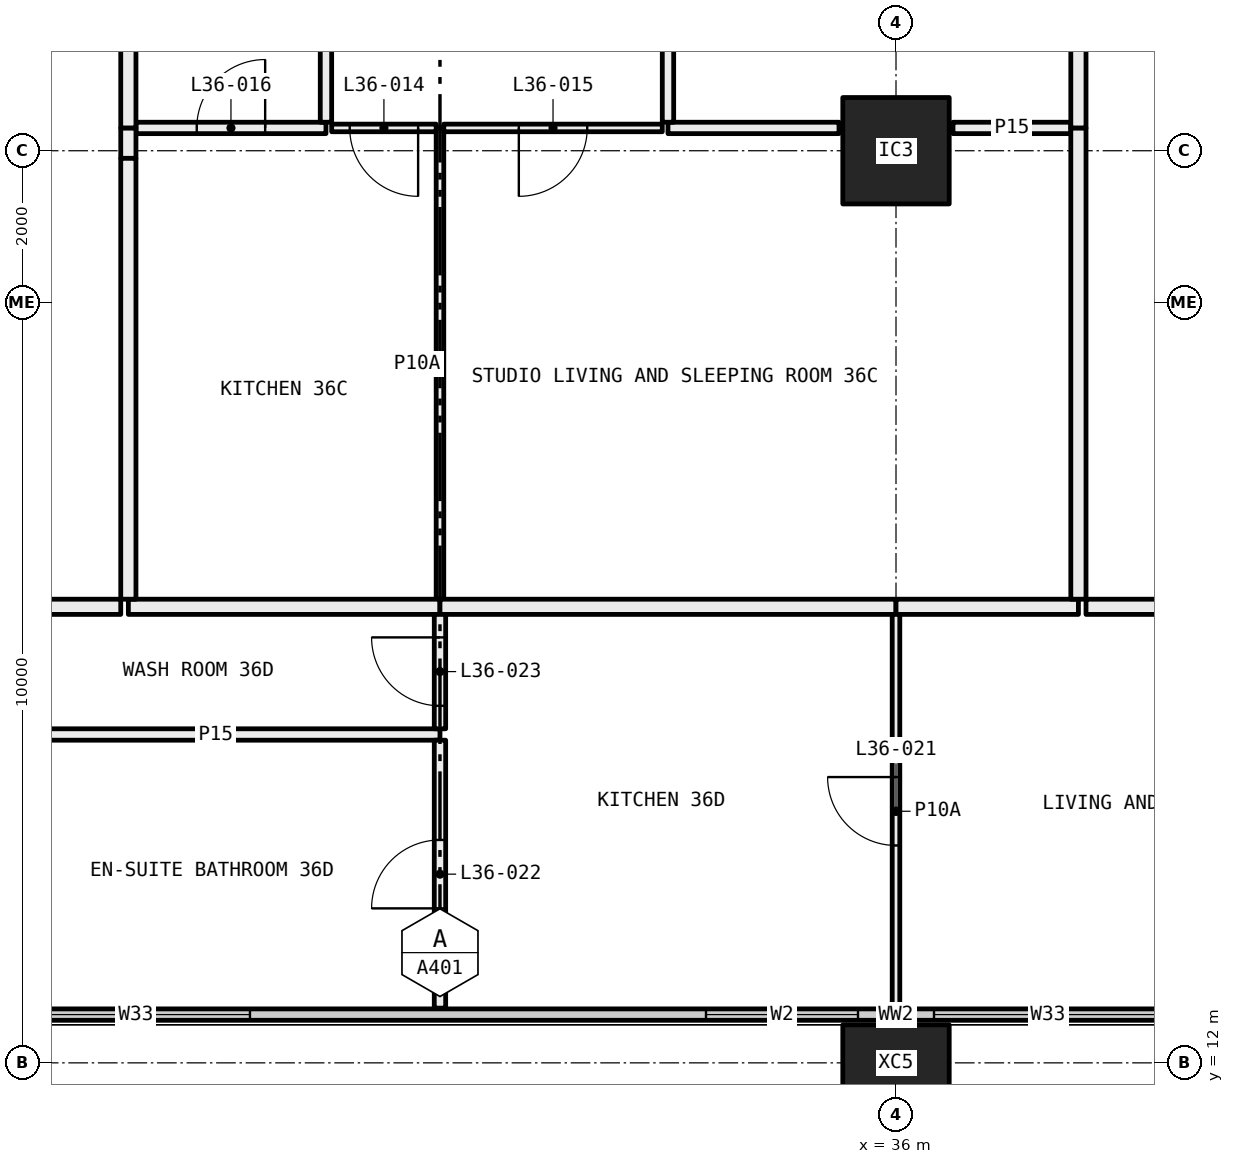
"""IFC4 building model, lengths in metres.
Left out: names, types, materials, properties, quantities, classifications, styles, units other than length and angle.
Written with IfcOpenShell. Run it as: python <this file> out.ifc"""

import sys

from ifc_helpers import new_model, si_unit, direction, frame, frame_2d, origin, origin_2d, place, context, subcontext, project, spatial, rectangle, hollow_rectangle, extrude, element, fill, save


model = new_model("IFC4")
c1 = context("Model", 3, precision=1e-05, world=origin(), true_north=direction((0.0, 1.0)))
c2 = subcontext(c1, "Body", "Model", "MODEL_VIEW")
j1 = project(units=[si_unit("LENGTHUNIT", "METRE"), si_unit("PLANEANGLEUNIT", "RADIAN")], contexts=[c1])
p1 = place(None, origin())
s1 = spatial("IfcSite", under=j1, at=p1, CompositionType="ELEMENT")
p2 = place(p1, origin())
s2 = spatial("IfcBuilding", under=s1, at=p2, CompositionType="ELEMENT")
p3 = place(p2, frame((0.0, 0.0, 138.0)))
s3 = spatial("IfcBuildingStorey", under=s2, at=p3, CompositionType="ELEMENT", Elevation=138.0)
p4 = place(p3, frame((36.0, 12.0, -0.4), z_axis=(0.0, 0.0, 1.0), x_axis=(1.0, 0.0, 0.0)))
e1 = element("IfcColumn", 1, at=p4, inside=s3, PredefinedType="COLUMN", context=c2, shape_type="SweptSolid", body=[
    extrude(hollow_rectangle(XDim=1.4, YDim=1.0, WallThickness=0.055, at=origin_2d()), origin(), (0.0, 0.0, 1.0), 3.45),
])
p5 = place(p3, frame((36.0, 24.0, 0.0), z_axis=(0.0, 0.0, 1.0), x_axis=(1.0, 0.0, 0.0)))
e2 = element("IfcColumn", 2, at=p5, inside=s3, PredefinedType="COLUMN", context=c2, shape_type="SweptSolid", body=[
    extrude(hollow_rectangle(XDim=1.4, YDim=1.4, WallThickness=0.06, at=origin_2d()), origin(), (0.0, 0.0, 1.0), 3.05),
])
p6 = place(p3, frame((6.56, 12.635, 0.0), z_axis=(0.0, 0.0, 1.0), x_axis=(1.0, 0.0, 0.0)))
e3 = element("IfcWall", 3, at=p6, inside=s3, PredefinedType="ELEMENTEDWALL", context=c2, shape_type="SweptSolid", body=[
    extrude(rectangle(XDim=58.88, YDim=0.15, at=frame_2d((29.44, 0.0))), origin(), (0.0, 0.0, 1.0), 3.05),
])
p7 = place(p6, frame((0.44, 0.0, 0.45)))
e4 = element("IfcOpeningElement", 4, at=p7, cuts=e3, PredefinedType="OPENING", context=c2, shape_type="SweptSolid", body=[
    extrude(rectangle(XDim=4.5, YDim=2.55, at=frame_2d((2.25, 1.275))), frame((0.0, 0.085, 0.0), z_axis=(0.0, -1.0, 0.0), x_axis=(1.0, 0.0, 0.0)), (0.0, 0.0, 1.0), 0.17),
])
p8 = place(p6, frame((5.94, 0.0, 0.45)))
e5 = element("IfcOpeningElement", 5, at=p8, cuts=e3, PredefinedType="OPENING", context=c2, shape_type="SweptSolid", body=[
    extrude(rectangle(XDim=3.0, YDim=2.55, at=frame_2d((1.5, 1.275))), frame((0.0, 0.085, 0.0), z_axis=(0.0, -1.0, 0.0), x_axis=(1.0, 0.0, 0.0)), (0.0, 0.0, 1.0), 0.17),
])
p9 = place(p6, frame((13.94, 0.0, 0.45)))
e6 = element("IfcOpeningElement", 6, at=p9, cuts=e3, PredefinedType="OPENING", context=c2, shape_type="SweptSolid", body=[
    extrude(rectangle(XDim=3.0, YDim=2.55, at=frame_2d((1.5, 1.275))), frame((0.0, 0.085, 0.0), z_axis=(0.0, -1.0, 0.0), x_axis=(1.0, 0.0, 0.0)), (0.0, 0.0, 1.0), 0.17),
])
p10 = place(p6, frame((17.94, 0.0, 0.45)))
e7 = element("IfcOpeningElement", 7, at=p10, cuts=e3, PredefinedType="OPENING", context=c2, shape_type="SweptSolid", body=[
    extrude(rectangle(XDim=3.0, YDim=2.55, at=frame_2d((1.5, 1.275))), frame((0.0, 0.085, 0.0), z_axis=(0.0, -1.0, 0.0), x_axis=(1.0, 0.0, 0.0)), (0.0, 0.0, 1.0), 0.17),
])
p11 = place(p6, frame((26.94, 0.0, 0.45)))
e8 = element("IfcOpeningElement", 8, at=p11, cuts=e3, PredefinedType="OPENING", context=c2, shape_type="SweptSolid", body=[
    extrude(rectangle(XDim=2.0, YDim=2.55, at=frame_2d((1.0, 1.275))), frame((0.0, 0.085, 0.0), z_axis=(0.0, -1.0, 0.0), x_axis=(1.0, 0.0, 0.0)), (0.0, 0.0, 1.0), 0.17),
])
p12 = place(p6, frame((29.94, 0.0, 0.45)))
e9 = element("IfcOpeningElement", 9, at=p12, cuts=e3, PredefinedType="OPENING", context=c2, shape_type="SweptSolid", body=[
    extrude(rectangle(XDim=3.0, YDim=2.55, at=frame_2d((1.5, 1.275))), frame((0.0, 0.085, 0.0), z_axis=(0.0, -1.0, 0.0), x_axis=(1.0, 0.0, 0.0)), (0.0, 0.0, 1.0), 0.17),
])
p13 = place(p6, frame((37.94, 0.0, 0.45)))
e10 = element("IfcOpeningElement", 10, at=p13, cuts=e3, PredefinedType="OPENING", context=c2, shape_type="SweptSolid", body=[
    extrude(rectangle(XDim=3.0, YDim=2.55, at=frame_2d((1.5, 1.275))), frame((0.0, 0.085, 0.0), z_axis=(0.0, -1.0, 0.0), x_axis=(1.0, 0.0, 0.0)), (0.0, 0.0, 1.0), 0.17),
])
p14 = place(p6, frame((41.94, 0.0, 0.45)))
e11 = element("IfcOpeningElement", 11, at=p14, cuts=e3, PredefinedType="OPENING", context=c2, shape_type="SweptSolid", body=[
    extrude(rectangle(XDim=3.0, YDim=2.55, at=frame_2d((1.5, 1.275))), frame((0.0, 0.085, 0.0), z_axis=(0.0, -1.0, 0.0), x_axis=(1.0, 0.0, 0.0)), (0.0, 0.0, 1.0), 0.17),
])
p15 = place(p6, frame((50.94, 0.0, 0.45)))
e12 = element("IfcOpeningElement", 12, at=p15, cuts=e3, PredefinedType="OPENING", context=c2, shape_type="SweptSolid", body=[
    extrude(rectangle(XDim=2.0, YDim=2.55, at=frame_2d((1.0, 1.275))), frame((0.0, 0.085, 0.0), z_axis=(0.0, -1.0, 0.0), x_axis=(1.0, 0.0, 0.0)), (0.0, 0.0, 1.0), 0.17),
])
p16 = place(p6, frame((53.94, 0.0, 0.45)))
e13 = element("IfcOpeningElement", 13, at=p16, cuts=e3, PredefinedType="OPENING", context=c2, shape_type="SweptSolid", body=[
    extrude(rectangle(XDim=4.5, YDim=2.55, at=frame_2d((2.25, 1.275))), frame((0.0, 0.085, 0.0), z_axis=(0.0, -1.0, 0.0), x_axis=(1.0, 0.0, 0.0)), (0.0, 0.0, 1.0), 0.17),
])
p17 = place(p3, frame((30.0, 18.1, 0.0), z_axis=(0.0, 0.0, 1.0), x_axis=(0.0, 1.0, 0.0)))
e14 = element("IfcWall", 14, at=p17, inside=s3, PredefinedType="PARTITIONING", context=c2, shape_type="SweptSolid", body=[
    extrude(rectangle(XDim=6.2, YDim=0.1, at=frame_2d((3.1, 0.0))), origin(), (0.0, 0.0, 1.0), 2.45),
])
p18 = place(p3, frame((28.5, 24.3, 0.0), z_axis=(0.0, 0.0, 1.0), x_axis=(-1.0, 0.0, 0.0)))
e15 = element("IfcWall", 15, at=p18, inside=s3, PredefinedType="PARTITIONING", context=c2, shape_type="SweptSolid", body=[
    extrude(rectangle(XDim=2.5, YDim=0.15, at=frame_2d((1.25, 0.0))), origin(), (0.0, 0.0, 1.0), 3.05),
])
p19 = place(p18, frame((0.8, 0.0, 0.0)))
e16 = element("IfcOpeningElement", 16, at=p19, cuts=e15, PredefinedType="OPENING", context=c2, shape_type="SweptSolid", body=[
    extrude(rectangle(XDim=0.9, YDim=2.1, at=frame_2d((0.45, 1.05))), frame((0.0, 0.085, 0.0), z_axis=(0.0, -1.0, 0.0), x_axis=(1.0, 0.0, 0.0)), (0.0, 0.0, 1.0), 0.17),
])
p20 = place(p3, frame((29.95, 24.3, 0.0), z_axis=(0.0, 0.0, 1.0), x_axis=(-1.0, 0.0, 0.0)))
e17 = element("IfcWall", 17, at=p20, inside=s3, PredefinedType="PARTITIONING", context=c2, shape_type="SweptSolid", body=[
    extrude(rectangle(XDim=1.375, YDim=0.1, at=frame_2d((0.688, 0.0))), origin(), (0.0, 0.0, 1.0), 3.05),
])
p21 = place(p20, frame((0.238, 0.0, 0.0)))
e18 = element("IfcOpeningElement", 18, at=p21, cuts=e17, PredefinedType="OPENING", context=c2, shape_type="SweptSolid", body=[
    extrude(rectangle(XDim=0.9, YDim=2.1, at=frame_2d((0.45, 1.05))), frame((0.0, 0.06, 0.0), z_axis=(0.0, -1.0, 0.0), x_axis=(1.0, 0.0, 0.0)), (0.0, 0.0, 1.0), 0.12),
])
p22 = place(p3, frame((25.9, 18.0, 0.0), z_axis=(0.0, 0.0, 1.0), x_axis=(1.0, 0.0, 0.0)))
e19 = element("IfcWall", 19, at=p22, inside=s3, PredefinedType="PARTITIONING", context=c2, shape_type="SweptSolid", body=[
    extrude(rectangle(XDim=4.1, YDim=0.2, at=frame_2d((2.05, 0.0))), origin(), (0.0, 0.0, 1.0), 3.05),
])
p23 = place(p3, frame((25.9, 24.3, 0.0), z_axis=(0.0, 0.0, 1.0), x_axis=(0.0, -1.0, 0.0)))
e20 = element("IfcWall", 20, at=p23, inside=s3, PredefinedType="PARTITIONING", context=c2, shape_type="SweptSolid", body=[
    extrude(rectangle(XDim=0.4, YDim=0.2, at=frame_2d((0.2, 0.0))), origin(), (0.0, 0.0, 1.0), 2.45),
])
p24 = place(p3, frame((25.9, 23.9, 0.0), z_axis=(0.0, 0.0, 1.0), x_axis=(0.0, -1.0, 0.0)))
e21 = element("IfcWall", 21, at=p24, inside=s3, PredefinedType="PARTITIONING", context=c2, shape_type="SweptSolid", body=[
    extrude(rectangle(XDim=5.8, YDim=0.2, at=frame_2d((2.9, 0.0))), origin(), (0.0, 0.0, 1.0), 3.05),
])
p25 = place(p3, frame((32.925, 24.3, 0.0), z_axis=(0.0, 0.0, 1.0), x_axis=(-1.0, 0.0, 0.0)))
e22 = element("IfcWall", 22, at=p25, inside=s3, PredefinedType="PARTITIONING", context=c2, shape_type="SweptSolid", body=[
    extrude(rectangle(XDim=2.875, YDim=0.1, at=frame_2d((1.438, 0.0))), origin(), (0.0, 0.0, 1.0), 3.05),
])
p26 = place(p25, frame((0.988, 0.0, 0.0)))
e23 = element("IfcOpeningElement", 23, at=p26, cuts=e22, PredefinedType="OPENING", context=c2, shape_type="SweptSolid", body=[
    extrude(rectangle(XDim=0.9, YDim=2.1, at=frame_2d((0.45, 1.05))), frame((0.0, 0.06, 0.0), z_axis=(0.0, -1.0, 0.0), x_axis=(1.0, 0.0, 0.0)), (0.0, 0.0, 1.0), 0.12),
])
p27 = place(p3, frame((35.25, 24.3, 0.0), z_axis=(0.0, 0.0, 1.0), x_axis=(-1.0, 0.0, 0.0)))
e24 = element("IfcWall", 24, at=p27, inside=s3, PredefinedType="PARTITIONING", context=c2, shape_type="SweptSolid", body=[
    extrude(rectangle(XDim=2.25, YDim=0.15, at=frame_2d((1.125, 0.0))), origin(), (0.0, 0.0, 1.0), 3.05),
])
p28 = place(p3, frame((38.3, 24.3, 0.0), z_axis=(0.0, 0.0, 1.0), x_axis=(-1.0, 0.0, 0.0)))
e25 = element("IfcWall", 25, at=p28, inside=s3, PredefinedType="PARTITIONING", context=c2, shape_type="SweptSolid", body=[
    extrude(rectangle(XDim=1.55, YDim=0.15, at=frame_2d((0.775, 0.0))), origin(), (0.0, 0.0, 1.0), 3.05),
])
p29 = place(p3, frame((30.0, 18.0, 0.0), z_axis=(0.0, 0.0, 1.0), x_axis=(1.0, 0.0, 0.0)))
e26 = element("IfcWall", 26, at=p29, inside=s3, PredefinedType="PARTITIONING", context=c2, shape_type="SweptSolid", body=[
    extrude(rectangle(XDim=6.0, YDim=0.2, at=frame_2d((3.0, 0.0))), origin(), (0.0, 0.0, 1.0), 2.45),
])
p30 = place(p3, frame((36.0, 18.0, 0.0), z_axis=(0.0, 0.0, 1.0), x_axis=(1.0, 0.0, 0.0)))
e27 = element("IfcWall", 27, at=p30, inside=s3, PredefinedType="PARTITIONING", context=c2, shape_type="SweptSolid", body=[
    extrude(rectangle(XDim=2.4, YDim=0.2, at=frame_2d((1.2, 0.0))), origin(), (0.0, 0.0, 1.0), 2.45),
])
p31 = place(p3, frame((38.4, 18.1, 0.0), z_axis=(0.0, 0.0, 1.0), x_axis=(0.0, 1.0, 0.0)))
e28 = element("IfcWall", 28, at=p31, inside=s3, PredefinedType="PARTITIONING", context=c2, shape_type="SweptSolid", body=[
    extrude(rectangle(XDim=6.2, YDim=0.2, at=frame_2d((3.1, 0.0))), origin(), (0.0, 0.0, 1.0), 2.45),
])
p32 = place(p3, frame((28.5, 24.375, 0.0), z_axis=(0.0, 0.0, 1.0), x_axis=(0.0, 1.0, 0.0)))
e29 = element("IfcWall", 29, at=p32, inside=s3, PredefinedType="PARTITIONING", context=c2, shape_type="SweptSolid", body=[
    extrude(rectangle(XDim=1.927, YDim=0.15, at=frame_2d((0.963, 0.0))), origin(), (0.0, 0.0, 1.0), 3.05),
])
p33 = place(p3, frame((25.9, 26.377, 0.0), z_axis=(0.0, 0.0, 1.0), x_axis=(0.0, -1.0, 0.0)))
e30 = element("IfcWall", 30, at=p33, inside=s3, PredefinedType="PARTITIONING", context=c2, shape_type="SweptSolid", body=[
    extrude(rectangle(XDim=2.077, YDim=0.2, at=frame_2d((1.039, 0.0))), origin(), (0.0, 0.0, 1.0), 3.05),
])
p34 = place(p3, frame((33.0, 24.375, 0.0), z_axis=(0.0, 0.0, 1.0), x_axis=(0.0, 1.0, 0.0)))
e31 = element("IfcWall", 31, at=p34, inside=s3, PredefinedType="PARTITIONING", context=c2, shape_type="SweptSolid", body=[
    extrude(rectangle(XDim=4.325, YDim=0.15, at=frame_2d((2.163, 0.0))), origin(), (0.0, 0.0, 1.0), 3.05),
])
p35 = place(p34, frame((1.712, 0.0, 0.0)))
e32 = element("IfcOpeningElement", 32, at=p35, cuts=e31, PredefinedType="OPENING", context=c2, shape_type="SweptSolid", body=[
    extrude(rectangle(XDim=0.9, YDim=2.1, at=frame_2d((0.45, 1.05))), frame((0.0, 0.085, 0.0), z_axis=(0.0, -1.0, 0.0), x_axis=(1.0, 0.0, 0.0)), (0.0, 0.0, 1.0), 0.17),
])
p36 = place(p3, frame((38.4, 24.3, 0.0), z_axis=(0.0, 0.0, 1.0), x_axis=(0.0, 1.0, 0.0)))
e33 = element("IfcWall", 33, at=p36, inside=s3, PredefinedType="PARTITIONING", context=c2, shape_type="SweptSolid", body=[
    extrude(rectangle(XDim=4.5, YDim=0.2, at=frame_2d((2.25, 0.0))), origin(), (0.0, 0.0, 1.0), 3.05),
])
p37 = place(p3, frame((30.0, 16.32, 0.0), z_axis=(0.0, 0.0, 1.0), x_axis=(-1.0, 0.0, 0.0)))
e34 = element("IfcWall", 34, at=p37, inside=s3, PredefinedType="PARTITIONING", context=c2, shape_type="SweptSolid", body=[
    extrude(rectangle(XDim=5.9, YDim=0.15, at=frame_2d((2.95, 0.0))), origin(), (0.0, 0.0, 1.0), 3.05),
])
p38 = place(p3, frame((30.0, 12.72, 0.0), z_axis=(0.0, 0.0, 1.0), x_axis=(0.0, 1.0, 0.0)))
e35 = element("IfcWall", 35, at=p38, inside=s3, PredefinedType="PARTITIONING", context=c2, shape_type="SweptSolid", body=[
    extrude(rectangle(XDim=3.525, YDim=0.15, at=frame_2d((1.763, 0.0))), origin(), (0.0, 0.0, 1.0), 3.05),
])
p39 = place(p38, frame((1.312, 0.0, 0.0)))
e36 = element("IfcOpeningElement", 36, at=p39, cuts=e35, PredefinedType="OPENING", context=c2, shape_type="SweptSolid", body=[
    extrude(rectangle(XDim=0.9, YDim=2.1, at=frame_2d((0.45, 1.05))), frame((0.0, 0.085, 0.0), z_axis=(0.0, -1.0, 0.0), x_axis=(1.0, 0.0, 0.0)), (0.0, 0.0, 1.0), 0.17),
])
p40 = place(p3, frame((30.0, 16.395, 0.0), z_axis=(0.0, 0.0, 1.0), x_axis=(0.0, 1.0, 0.0)))
e37 = element("IfcWall", 37, at=p40, inside=s3, PredefinedType="PARTITIONING", context=c2, shape_type="SweptSolid", body=[
    extrude(rectangle(XDim=1.505, YDim=0.15, at=frame_2d((0.752, 0.0))), origin(), (0.0, 0.0, 1.0), 3.05),
])
p41 = place(p40, frame((0.302, 0.0, 0.0)))
e38 = element("IfcOpeningElement", 38, at=p41, cuts=e37, PredefinedType="OPENING", context=c2, shape_type="SweptSolid", body=[
    extrude(rectangle(XDim=0.9, YDim=2.1, at=frame_2d((0.45, 1.05))), frame((0.0, 0.085, 0.0), z_axis=(0.0, -1.0, 0.0), x_axis=(1.0, 0.0, 0.0)), (0.0, 0.0, 1.0), 0.17),
])
p42 = place(p3, frame((25.8, 18.0, 0.0), z_axis=(0.0, 0.0, 1.0), x_axis=(-1.0, 0.0, 0.0)))
e39 = element("IfcWall", 39, at=p42, inside=s3, PredefinedType="PARTITIONING", context=c2, shape_type="SweptSolid", body=[
    extrude(rectangle(XDim=1.7, YDim=0.2, at=frame_2d((0.85, 0.0))), origin(), (0.0, 0.0, 1.0), 3.05),
])
p43 = place(p3, frame((36.0, 12.72, 0.0), z_axis=(0.0, 0.0, 1.0), x_axis=(0.0, 1.0, 0.0)))
e40 = element("IfcWall", 40, at=p43, inside=s3, PredefinedType="PARTITIONING", context=c2, shape_type="SweptSolid", body=[
    extrude(rectangle(XDim=5.18, YDim=0.1, at=frame_2d((2.59, 0.0))), origin(), (0.0, 0.0, 1.0), 2.45),
])
p44 = place(p43, frame((2.14, 0.0, 0.0)))
e41 = element("IfcOpeningElement", 41, at=p44, cuts=e40, PredefinedType="OPENING", context=c2, shape_type="SweptSolid", body=[
    extrude(rectangle(XDim=0.9, YDim=2.1, at=frame_2d((0.45, 1.05))), frame((0.0, 0.06, 0.0), z_axis=(0.0, -1.0, 0.0), x_axis=(1.0, 0.0, 0.0)), (0.0, 0.0, 1.0), 0.12),
])
p45 = place(p3, frame((40.8, 18.0, 0.0), z_axis=(0.0, 0.0, 1.0), x_axis=(-1.0, 0.0, 0.0)))
e42 = element("IfcWall", 42, at=p45, inside=s3, PredefinedType="PARTITIONING", context=c2, shape_type="SweptSolid", body=[
    extrude(rectangle(XDim=2.3, YDim=0.2, at=frame_2d((1.15, 0.0))), origin(), (0.0, 0.0, 1.0), 3.05),
])
p46 = place(p10, origin())
e43 = element("IfcWindow", 43, at=p46, inside=s3, PartitioningType="SINGLE_PANEL", PredefinedType="WINDOW", context=c2, shape_type="SweptSolid", body=[
    extrude(rectangle(XDim=3.0, YDim=2.55, at=frame_2d((1.5, 1.275))), frame((0.0, 0.03, 0.0), z_axis=(0.0, -1.0, 0.0), x_axis=(1.0, 0.0, 0.0)), (0.0, 0.0, 1.0), 0.06),
])
fill(e7, e43)
p47 = place(p11, origin())
e44 = element("IfcWindow", 44, at=p47, inside=s3, PartitioningType="SINGLE_PANEL", PredefinedType="WINDOW", context=c2, shape_type="SweptSolid", body=[
    extrude(rectangle(XDim=2.0, YDim=2.55, at=frame_2d((1.0, 1.275))), frame((0.0, 0.03, 0.0), z_axis=(0.0, -1.0, 0.0), x_axis=(1.0, 0.0, 0.0)), (0.0, 0.0, 1.0), 0.06),
])
fill(e8, e44)
p48 = place(p12, origin())
e45 = element("IfcWindow", 45, at=p48, inside=s3, PartitioningType="SINGLE_PANEL", PredefinedType="WINDOW", context=c2, shape_type="SweptSolid", body=[
    extrude(rectangle(XDim=3.0, YDim=2.55, at=frame_2d((1.5, 1.275))), frame((0.0, 0.03, 0.0), z_axis=(0.0, -1.0, 0.0), x_axis=(1.0, 0.0, 0.0)), (0.0, 0.0, 1.0), 0.06),
])
fill(e9, e45)
p49 = place(p21, origin())
e46 = element("IfcDoor", 46, at=p49, inside=s3, OperationType="SINGLE_SWING_RIGHT", PredefinedType="DOOR", context=c2, shape_type="SweptSolid", body=[
    extrude(rectangle(XDim=0.9, YDim=2.1, at=frame_2d((0.45, 1.05))), frame((0.0, 0.025, 0.0), z_axis=(0.0, -1.0, 0.0), x_axis=(1.0, 0.0, 0.0)), (0.0, 0.0, 1.0), 0.05),
])
fill(e18, e46)
p50 = place(p26, origin())
e47 = element("IfcDoor", 47, at=p50, inside=s3, OperationType="SINGLE_SWING_LEFT", PredefinedType="DOOR", context=c2, shape_type="SweptSolid", body=[
    extrude(rectangle(XDim=0.9, YDim=2.1, at=frame_2d((0.45, 1.05))), frame((0.0, 0.025, 0.0), z_axis=(0.0, -1.0, 0.0), x_axis=(1.0, 0.0, 0.0)), (0.0, 0.0, 1.0), 0.05),
])
fill(e23, e47)
p51 = place(p19, frame((0.9, 0.0, 0.0), x_axis=(-1.0, 0.0, 0.0)))
e48 = element("IfcDoor", 48, at=p51, inside=s3, OperationType="SINGLE_SWING_LEFT", PredefinedType="DOOR", context=c2, shape_type="SweptSolid", body=[
    extrude(rectangle(XDim=0.9, YDim=2.1, at=frame_2d((0.45, 1.05))), frame((0.0, 0.025, 0.0), z_axis=(0.0, -1.0, 0.0), x_axis=(1.0, 0.0, 0.0)), (0.0, 0.0, 1.0), 0.05),
])
fill(e16, e48)
p52 = place(p44, origin())
e49 = element("IfcDoor", 49, at=p52, inside=s3, OperationType="SINGLE_SWING_LEFT", PredefinedType="DOOR", context=c2, shape_type="SweptSolid", body=[
    extrude(rectangle(XDim=0.9, YDim=2.1, at=frame_2d((0.45, 1.05))), frame((0.0, 0.025, 0.0), z_axis=(0.0, -1.0, 0.0), x_axis=(1.0, 0.0, 0.0)), (0.0, 0.0, 1.0), 0.05),
])
fill(e41, e49)
p53 = place(p39, origin())
e50 = element("IfcDoor", 50, at=p53, inside=s3, OperationType="SINGLE_SWING_RIGHT", PredefinedType="DOOR", context=c2, shape_type="SweptSolid", body=[
    extrude(rectangle(XDim=0.9, YDim=2.1, at=frame_2d((0.45, 1.05))), frame((0.0, 0.025, 0.0), z_axis=(0.0, -1.0, 0.0), x_axis=(1.0, 0.0, 0.0)), (0.0, 0.0, 1.0), 0.05),
])
fill(e36, e50)
p54 = place(p41, origin())
e51 = element("IfcDoor", 51, at=p54, inside=s3, OperationType="SINGLE_SWING_LEFT", PredefinedType="DOOR", context=c2, shape_type="SweptSolid", body=[
    extrude(rectangle(XDim=0.9, YDim=2.1, at=frame_2d((0.45, 1.05))), frame((0.0, 0.025, 0.0), z_axis=(0.0, -1.0, 0.0), x_axis=(1.0, 0.0, 0.0)), (0.0, 0.0, 1.0), 0.05),
])
fill(e38, e51)
save(model, sys.argv[1])
